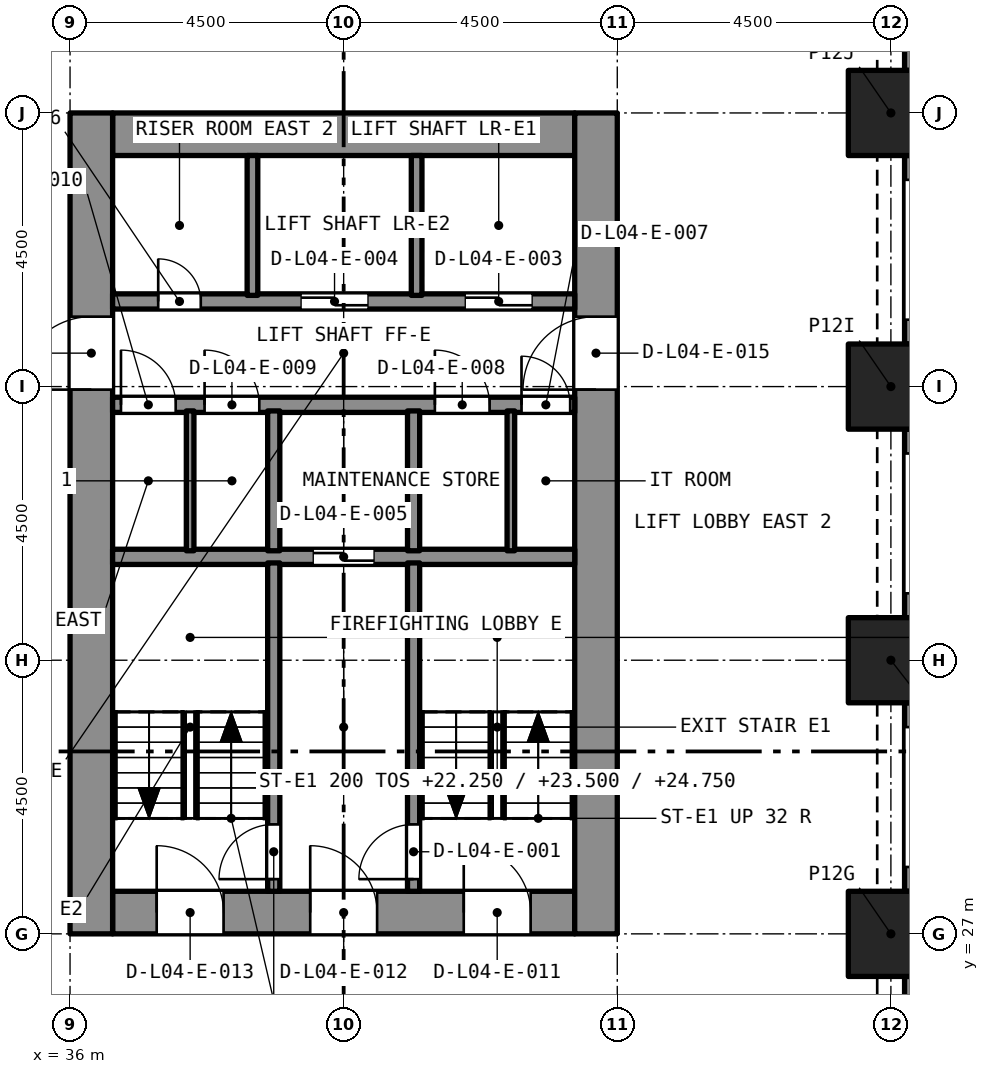
"""IFC4 building model, lengths in metres.
Left out: names, types, materials, properties, quantities, classifications, styles, units other than length and angle.
Written with IfcOpenShell. Run it as: python <this file> out.ifc"""

import sys

from ifc_helpers import new_model, si_unit, direction, frame, frame_2d, origin, origin_2d, place, context, subcontext, project, spatial, rectangle, extrude, element, fill, save


model = new_model("IFC4")
c1 = context("Model", 3, precision=1e-05, world=origin(), true_north=direction((0.0, 1.0)))
c2 = subcontext(c1, "Body", "Model", "MODEL_VIEW")
j1 = project(units=[si_unit("LENGTHUNIT", "METRE"), si_unit("PLANEANGLEUNIT", "RADIAN")], contexts=[c1])
p1 = place(None, origin())
s1 = spatial("IfcSite", under=j1, at=p1, CompositionType="ELEMENT")
p2 = place(p1, origin())
s2 = spatial("IfcBuilding", under=s1, at=p2, CompositionType="ELEMENT")
p3 = place(p2, frame((0.0, 0.0, 21.0)))
s3 = spatial("IfcBuildingStorey", under=s2, at=p3, CompositionType="ELEMENT", Elevation=21.0)
for number, where, z_axis, x_axis in (
    (1, (49.5, 27.0, 0.0), (0.0, 0.0, 1.0), (1.0, 0.0, 0.0)),
    (2, (49.5, 31.5, 0.0), (0.0, 0.0, 1.0), (1.0, 0.0, 0.0)),
    (3, (49.5, 36.0, 0.0), (0.0, 0.0, 1.0), (1.0, 0.0, 0.0)),
    (4, (49.5, 40.5, 0.0), (0.0, 0.0, 1.0), (1.0, 0.0, 0.0)),
):
    element("IfcColumn", number, at=place(p3, frame(where, z_axis=z_axis, x_axis=x_axis)), inside=s3, PredefinedType="COLUMN", context=c2, shape_type="SweptSolid", body=[
        extrude(rectangle(XDim=1.4, YDim=1.4, at=origin_2d()), origin(), (0.0, 0.0, 1.0), 5.0),
    ])
p4 = place(p3, frame((36.7, 27.35, 0.0), z_axis=(0.0, 0.0, 1.0), x_axis=(1.0, 0.0, 0.0)))
e5 = element("IfcWall", 5, at=p4, inside=s3, PredefinedType="SOLIDWALL", context=c2, shape_type="SweptSolid", body=[
    extrude(rectangle(XDim=7.6, YDim=0.7, at=frame_2d((3.8, 0.0))), origin(), (0.0, 0.0, 1.0), 5.0),
])
p5 = place(p4, frame((5.775, 0.0, 0.0)))
e6 = element("IfcOpeningElement", 6, at=p5, cuts=e5, PredefinedType="OPENING", context=c2, shape_type="SweptSolid", body=[
    extrude(rectangle(XDim=1.1, YDim=2.1, at=frame_2d((0.55, 1.05))), frame((0.0, 0.36, 0.0), z_axis=(0.0, -1.0, 0.0), x_axis=(1.0, 0.0, 0.0)), (0.0, 0.0, 1.0), 0.72),
])
p6 = place(p4, frame((3.25, 0.0, 0.0)))
e7 = element("IfcOpeningElement", 7, at=p6, cuts=e5, PredefinedType="OPENING", context=c2, shape_type="SweptSolid", body=[
    extrude(rectangle(XDim=1.1, YDim=2.1, at=frame_2d((0.55, 1.05))), frame((0.0, 0.36, 0.0), z_axis=(0.0, -1.0, 0.0), x_axis=(1.0, 0.0, 0.0)), (0.0, 0.0, 1.0), 0.72),
])
p7 = place(p4, frame((0.725, 0.0, 0.0)))
e8 = element("IfcOpeningElement", 8, at=p7, cuts=e5, PredefinedType="OPENING", context=c2, shape_type="SweptSolid", body=[
    extrude(rectangle(XDim=1.1, YDim=2.1, at=frame_2d((0.55, 1.05))), frame((0.0, 0.36, 0.0), z_axis=(0.0, -1.0, 0.0), x_axis=(1.0, 0.0, 0.0)), (0.0, 0.0, 1.0), 0.72),
])
p8 = place(p3, frame((36.7, 40.15, 0.0), z_axis=(0.0, 0.0, 1.0), x_axis=(1.0, 0.0, 0.0)))
e9 = element("IfcWall", 9, at=p8, inside=s3, PredefinedType="SOLIDWALL", context=c2, shape_type="SweptSolid", body=[
    extrude(rectangle(XDim=7.6, YDim=0.7, at=frame_2d((3.8, 0.0))), origin(), (0.0, 0.0, 1.0), 5.0),
])
p9 = place(p3, frame((36.35, 27.0, 0.0), z_axis=(0.0, 0.0, 1.0), x_axis=(0.0, 1.0, 0.0)))
e10 = element("IfcWall", 10, at=p9, inside=s3, PredefinedType="SOLIDWALL", context=c2, shape_type="SweptSolid", body=[
    extrude(rectangle(XDim=13.5, YDim=0.7, at=frame_2d((6.75, 0.0))), origin(), (0.0, 0.0, 1.0), 5.0),
])
p10 = place(p9, frame((8.95, 0.0, 0.0)))
e11 = element("IfcOpeningElement", 11, at=p10, cuts=e10, PredefinedType="OPENING", context=c2, shape_type="SweptSolid", body=[
    extrude(rectangle(XDim=1.2, YDim=2.1, at=frame_2d((0.6, 1.05))), frame((0.0, 0.36, 0.0), z_axis=(0.0, -1.0, 0.0), x_axis=(1.0, 0.0, 0.0)), (0.0, 0.0, 1.0), 0.72),
])
p11 = place(p3, frame((44.65, 27.0, 0.0), z_axis=(0.0, 0.0, 1.0), x_axis=(0.0, 1.0, 0.0)))
e12 = element("IfcWall", 12, at=p11, inside=s3, PredefinedType="SOLIDWALL", context=c2, shape_type="SweptSolid", body=[
    extrude(rectangle(XDim=13.5, YDim=0.7, at=frame_2d((6.75, 0.0))), origin(), (0.0, 0.0, 1.0), 5.0),
])
p12 = place(p11, frame((8.95, 0.0, 0.0)))
e13 = element("IfcOpeningElement", 13, at=p12, cuts=e12, PredefinedType="OPENING", context=c2, shape_type="SweptSolid", body=[
    extrude(rectangle(XDim=1.2, YDim=2.1, at=frame_2d((0.6, 1.05))), frame((0.0, 0.36, 0.0), z_axis=(0.0, -1.0, 0.0), x_axis=(1.0, 0.0, 0.0)), (0.0, 0.0, 1.0), 0.72),
])
p13 = place(p3, frame((49.875, 26.3, 0.0), z_axis=(0.0, 0.0, 1.0), x_axis=(0.0, -1.0, 0.0)))
e14 = element("IfcWall", 14, at=p13, inside=s3, PredefinedType="SOLIDWALL", context=c2, shape_type="SweptSolid", body=[
    extrude(rectangle(XDim=3.1, YDim=0.3, at=frame_2d((1.55, 0.0))), origin(), (0.0, 0.0, 1.0), 5.0),
])
p14 = place(p13, frame((0.4, 0.0, 0.45)))
e15 = element("IfcOpeningElement", 15, at=p14, cuts=e14, PredefinedType="OPENING", context=c2, shape_type="SweptSolid", body=[
    extrude(rectangle(XDim=2.3, YDim=3.3, at=frame_2d((1.15, 1.65))), frame((0.0, 0.16, 0.0), z_axis=(0.0, -1.0, 0.0), x_axis=(1.0, 0.0, 0.0)), (0.0, 0.0, 1.0), 0.32),
])
p15 = place(p3, frame((49.875, 30.8, 0.0), z_axis=(0.0, 0.0, 1.0), x_axis=(0.0, -1.0, 0.0)))
e16 = element("IfcWall", 16, at=p15, inside=s3, PredefinedType="SOLIDWALL", context=c2, shape_type="SweptSolid", body=[
    extrude(rectangle(XDim=3.1, YDim=0.3, at=frame_2d((1.55, 0.0))), origin(), (0.0, 0.0, 1.0), 5.0),
])
p16 = place(p15, frame((0.4, 0.0, 0.45)))
e17 = element("IfcOpeningElement", 17, at=p16, cuts=e16, PredefinedType="OPENING", context=c2, shape_type="SweptSolid", body=[
    extrude(rectangle(XDim=2.3, YDim=3.3, at=frame_2d((1.15, 1.65))), frame((0.0, 0.16, 0.0), z_axis=(0.0, -1.0, 0.0), x_axis=(1.0, 0.0, 0.0)), (0.0, 0.0, 1.0), 0.32),
])
p17 = place(p3, frame((49.875, 35.3, 0.0), z_axis=(0.0, 0.0, 1.0), x_axis=(0.0, -1.0, 0.0)))
e18 = element("IfcWall", 18, at=p17, inside=s3, PredefinedType="SOLIDWALL", context=c2, shape_type="SweptSolid", body=[
    extrude(rectangle(XDim=3.1, YDim=0.3, at=frame_2d((1.55, 0.0))), origin(), (0.0, 0.0, 1.0), 5.0),
])
p18 = place(p17, frame((0.4, 0.0, 0.45)))
e19 = element("IfcOpeningElement", 19, at=p18, cuts=e18, PredefinedType="OPENING", context=c2, shape_type="SweptSolid", body=[
    extrude(rectangle(XDim=2.3, YDim=3.3, at=frame_2d((1.15, 1.65))), frame((0.0, 0.16, 0.0), z_axis=(0.0, -1.0, 0.0), x_axis=(1.0, 0.0, 0.0)), (0.0, 0.0, 1.0), 0.32),
])
p19 = place(p3, frame((49.875, 39.8, 0.0), z_axis=(0.0, 0.0, 1.0), x_axis=(0.0, -1.0, 0.0)))
e20 = element("IfcWall", 20, at=p19, inside=s3, PredefinedType="SOLIDWALL", context=c2, shape_type="SweptSolid", body=[
    extrude(rectangle(XDim=3.1, YDim=0.3, at=frame_2d((1.55, 0.0))), origin(), (0.0, 0.0, 1.0), 5.0),
])
p20 = place(p19, frame((0.4, 0.0, 0.45)))
e21 = element("IfcOpeningElement", 21, at=p20, cuts=e20, PredefinedType="OPENING", context=c2, shape_type="SweptSolid", body=[
    extrude(rectangle(XDim=2.3, YDim=3.3, at=frame_2d((1.15, 1.65))), frame((0.0, 0.16, 0.0), z_axis=(0.0, -1.0, 0.0), x_axis=(1.0, 0.0, 0.0)), (0.0, 0.0, 1.0), 0.32),
])
p21 = place(p3, frame((49.875, 44.3, 0.0), z_axis=(0.0, 0.0, 1.0), x_axis=(0.0, -1.0, 0.0)))
e22 = element("IfcWall", 22, at=p21, inside=s3, PredefinedType="SOLIDWALL", context=c2, shape_type="SweptSolid", body=[
    extrude(rectangle(XDim=3.1, YDim=0.3, at=frame_2d((1.55, 0.0))), origin(), (0.0, 0.0, 1.0), 5.0),
])
p22 = place(p21, frame((0.4, 0.0, 0.45)))
e23 = element("IfcOpeningElement", 23, at=p22, cuts=e22, PredefinedType="OPENING", context=c2, shape_type="SweptSolid", body=[
    extrude(rectangle(XDim=2.3, YDim=3.3, at=frame_2d((1.15, 1.65))), frame((0.0, 0.16, 0.0), z_axis=(0.0, -1.0, 0.0), x_axis=(1.0, 0.0, 0.0)), (0.0, 0.0, 1.0), 0.32),
])
p23 = place(p3, frame((36.7, 33.2, 0.0), z_axis=(0.0, 0.0, 1.0), x_axis=(1.0, 0.0, 0.0)))
e24 = element("IfcWall", 24, at=p23, inside=s3, PredefinedType="SOLIDWALL", context=c2, shape_type="SweptSolid", body=[
    extrude(rectangle(XDim=7.6, YDim=0.25, at=frame_2d((3.8, 0.0))), origin(), (0.0, 0.0, 1.0), 4.65),
])
p24 = place(p23, frame((3.3, 0.0, 0.0)))
e25 = element("IfcOpeningElement", 25, at=p24, cuts=e24, PredefinedType="OPENING", context=c2, shape_type="SweptSolid", body=[
    extrude(rectangle(XDim=1.0, YDim=2.1, at=frame_2d((0.5, 1.05))), frame((0.0, 0.135, 0.0), z_axis=(0.0, -1.0, 0.0), x_axis=(1.0, 0.0, 0.0)), (0.0, 0.0, 1.0), 0.27),
])
p25 = place(p3, frame((36.7, 35.7, 0.0), z_axis=(0.0, 0.0, 1.0), x_axis=(1.0, 0.0, 0.0)))
e26 = element("IfcWall", 26, at=p25, inside=s3, PredefinedType="SOLIDWALL", context=c2, shape_type="SweptSolid", body=[
    extrude(rectangle(XDim=7.6, YDim=0.25, at=frame_2d((3.8, 0.0))), origin(), (0.0, 0.0, 1.0), 4.65),
])
p26 = place(p25, frame((6.725, 0.0, 0.0)))
e27 = element("IfcOpeningElement", 27, at=p26, cuts=e26, PredefinedType="OPENING", context=c2, shape_type="SweptSolid", body=[
    extrude(rectangle(XDim=0.8, YDim=2.1, at=frame_2d((0.4, 1.05))), frame((0.0, 0.135, 0.0), z_axis=(0.0, -1.0, 0.0), x_axis=(1.0, 0.0, 0.0)), (0.0, 0.0, 1.0), 0.27),
])
p27 = place(p25, frame((5.3, 0.0, 0.0)))
e28 = element("IfcOpeningElement", 28, at=p27, cuts=e26, PredefinedType="OPENING", context=c2, shape_type="SweptSolid", body=[
    extrude(rectangle(XDim=0.9, YDim=2.1, at=frame_2d((0.45, 1.05))), frame((0.0, 0.135, 0.0), z_axis=(0.0, -1.0, 0.0), x_axis=(1.0, 0.0, 0.0)), (0.0, 0.0, 1.0), 0.27),
])
p28 = place(p25, frame((1.512, 0.0, 0.0)))
e29 = element("IfcOpeningElement", 29, at=p28, cuts=e26, PredefinedType="OPENING", context=c2, shape_type="SweptSolid", body=[
    extrude(rectangle(XDim=0.9, YDim=2.1, at=frame_2d((0.45, 1.05))), frame((0.0, 0.135, 0.0), z_axis=(0.0, -1.0, 0.0), x_axis=(1.0, 0.0, 0.0)), (0.0, 0.0, 1.0), 0.27),
])
p29 = place(p25, frame((0.137, 0.0, 0.0)))
e30 = element("IfcOpeningElement", 30, at=p29, cuts=e26, PredefinedType="OPENING", context=c2, shape_type="SweptSolid", body=[
    extrude(rectangle(XDim=0.9, YDim=2.1, at=frame_2d((0.45, 1.05))), frame((0.0, 0.135, 0.0), z_axis=(0.0, -1.0, 0.0), x_axis=(1.0, 0.0, 0.0)), (0.0, 0.0, 1.0), 0.27),
])
p30 = place(p3, frame((36.7, 37.4, 0.0), z_axis=(0.0, 0.0, 1.0), x_axis=(1.0, 0.0, 0.0)))
e31 = element("IfcWall", 31, at=p30, inside=s3, PredefinedType="SOLIDWALL", context=c2, shape_type="SweptSolid", body=[
    extrude(rectangle(XDim=7.6, YDim=0.25, at=frame_2d((3.8, 0.0))), origin(), (0.0, 0.0, 1.0), 4.65),
])
p31 = place(p30, frame((5.8, 0.0, 0.0)))
e32 = element("IfcOpeningElement", 32, at=p31, cuts=e31, PredefinedType="OPENING", context=c2, shape_type="SweptSolid", body=[
    extrude(rectangle(XDim=1.1, YDim=2.4, at=frame_2d((0.55, 1.2))), frame((0.0, 0.135, 0.0), z_axis=(0.0, -1.0, 0.0), x_axis=(1.0, 0.0, 0.0)), (0.0, 0.0, 1.0), 0.27),
])
p32 = place(p30, frame((3.1, 0.0, 0.0)))
e33 = element("IfcOpeningElement", 33, at=p32, cuts=e31, PredefinedType="OPENING", context=c2, shape_type="SweptSolid", body=[
    extrude(rectangle(XDim=1.1, YDim=2.4, at=frame_2d((0.55, 1.2))), frame((0.0, 0.135, 0.0), z_axis=(0.0, -1.0, 0.0), x_axis=(1.0, 0.0, 0.0)), (0.0, 0.0, 1.0), 0.27),
])
p33 = place(p30, frame((0.75, 0.0, 0.0)))
e34 = element("IfcOpeningElement", 34, at=p33, cuts=e31, PredefinedType="OPENING", context=c2, shape_type="SweptSolid", body=[
    extrude(rectangle(XDim=0.7, YDim=2.1, at=frame_2d((0.35, 1.05))), frame((0.0, 0.135, 0.0), z_axis=(0.0, -1.0, 0.0), x_axis=(1.0, 0.0, 0.0)), (0.0, 0.0, 1.0), 0.27),
])
p34 = place(p3, frame((41.65, 27.7, 0.0), z_axis=(0.0, 0.0, 1.0), x_axis=(0.0, 1.0, 0.0)))
e35 = element("IfcWall", 35, at=p34, inside=s3, PredefinedType="SOLIDWALL", context=c2, shape_type="SweptSolid", body=[
    extrude(rectangle(XDim=5.4, YDim=0.2, at=frame_2d((2.7, 0.0))), origin(), (0.0, 0.0, 1.0), 4.65),
])
p35 = place(p34, frame((0.2, 0.0, 0.0)))
e36 = element("IfcOpeningElement", 36, at=p35, cuts=e35, PredefinedType="OPENING", context=c2, shape_type="SweptSolid", body=[
    extrude(rectangle(XDim=0.9, YDim=2.1, at=frame_2d((0.45, 1.05))), frame((0.0, 0.11, 0.0), z_axis=(0.0, -1.0, 0.0), x_axis=(1.0, 0.0, 0.0)), (0.0, 0.0, 1.0), 0.22),
])
p36 = place(p3, frame((39.35, 27.7, 0.0), z_axis=(0.0, 0.0, 1.0), x_axis=(0.0, 1.0, 0.0)))
e37 = element("IfcWall", 37, at=p36, inside=s3, PredefinedType="SOLIDWALL", context=c2, shape_type="SweptSolid", body=[
    extrude(rectangle(XDim=5.4, YDim=0.2, at=frame_2d((2.7, 0.0))), origin(), (0.0, 0.0, 1.0), 4.65),
])
p37 = place(p36, frame((0.2, 0.0, 0.0)))
e38 = element("IfcOpeningElement", 38, at=p37, cuts=e37, PredefinedType="OPENING", context=c2, shape_type="SweptSolid", body=[
    extrude(rectangle(XDim=0.9, YDim=2.1, at=frame_2d((0.45, 1.05))), frame((0.0, 0.11, 0.0), z_axis=(0.0, -1.0, 0.0), x_axis=(1.0, 0.0, 0.0)), (0.0, 0.0, 1.0), 0.22),
])
for number, where, z_axis, x_axis in (
    (39, (41.65, 33.3, 0.0), (0.0, 0.0, 1.0), (0.0, 1.0, 0.0)),
    (40, (39.35, 33.3, 0.0), (0.0, 0.0, 1.0), (0.0, 1.0, 0.0)),
):
    element("IfcWall", number, at=place(p3, frame(where, z_axis=z_axis, x_axis=x_axis)), inside=s3, PredefinedType="SOLIDWALL", context=c2, shape_type="SweptSolid", body=[
        extrude(rectangle(XDim=2.3, YDim=0.2, at=frame_2d((1.15, 0.0))), origin(), (0.0, 0.0, 1.0), 4.65),
    ])
for number, where, z_axis, x_axis in (
    (41, (41.7, 37.5, 0.0), (0.0, 0.0, 1.0), (0.0, 1.0, 0.0)),
    (42, (39.0, 37.5, 0.0), (0.0, 0.0, 1.0), (0.0, 1.0, 0.0)),
):
    element("IfcWall", number, at=place(p3, frame(where, z_axis=z_axis, x_axis=x_axis)), inside=s3, PredefinedType="SOLIDWALL", context=c2, shape_type="SweptSolid", body=[
        extrude(rectangle(XDim=2.3, YDim=0.175, at=frame_2d((1.15, 0.0))), origin(), (0.0, 0.0, 1.0), 4.65),
    ])
for number, where, z_axis, x_axis in (
    (43, (43.25, 33.3, 0.0), (0.0, 0.0, 1.0), (0.0, 1.0, 0.0)),
    (44, (37.975, 33.3, 0.0), (0.0, 0.0, 1.0), (0.0, 1.0, 0.0)),
):
    element("IfcWall", number, at=place(p3, frame(where, z_axis=z_axis, x_axis=x_axis)), inside=s3, PredefinedType="PARTITIONING", context=c2, shape_type="SweptSolid", body=[
        extrude(rectangle(XDim=2.3, YDim=0.125, at=frame_2d((1.15, 0.0))), origin(), (0.0, 0.0, 1.0), 4.65),
    ])
p38 = place(p35, origin())
e45 = element("IfcDoor", 45, at=p38, inside=s3, OperationType="SINGLE_SWING_LEFT", PredefinedType="DOOR", context=c2, shape_type="SweptSolid", body=[
    extrude(rectangle(XDim=0.9, YDim=2.1, at=frame_2d((0.45, 1.05))), frame((0.0, 0.025, 0.0), z_axis=(0.0, -1.0, 0.0), x_axis=(1.0, 0.0, 0.0)), (0.0, 0.0, 1.0), 0.05),
])
fill(e36, e45)
p39 = place(p37, origin())
e46 = element("IfcDoor", 46, at=p39, inside=s3, OperationType="SINGLE_SWING_LEFT", PredefinedType="DOOR", context=c2, shape_type="SweptSolid", body=[
    extrude(rectangle(XDim=0.9, YDim=2.1, at=frame_2d((0.45, 1.05))), frame((0.0, 0.025, 0.0), z_axis=(0.0, -1.0, 0.0), x_axis=(1.0, 0.0, 0.0)), (0.0, 0.0, 1.0), 0.05),
])
fill(e38, e46)
p40 = place(p31, origin())
e47 = element("IfcDoor", 47, at=p40, inside=s3, OperationType="SLIDING_TO_LEFT", PredefinedType="DOOR", context=c2, shape_type="SweptSolid", body=[
    extrude(rectangle(XDim=1.1, YDim=2.4, at=frame_2d((0.55, 1.2))), frame((0.0, 0.025, 0.0), z_axis=(0.0, -1.0, 0.0), x_axis=(1.0, 0.0, 0.0)), (0.0, 0.0, 1.0), 0.05),
])
fill(e32, e47)
p41 = place(p32, origin())
e48 = element("IfcDoor", 48, at=p41, inside=s3, OperationType="SLIDING_TO_LEFT", PredefinedType="DOOR", context=c2, shape_type="SweptSolid", body=[
    extrude(rectangle(XDim=1.1, YDim=2.4, at=frame_2d((0.55, 1.2))), frame((0.0, 0.025, 0.0), z_axis=(0.0, -1.0, 0.0), x_axis=(1.0, 0.0, 0.0)), (0.0, 0.0, 1.0), 0.05),
])
fill(e33, e48)
p42 = place(p24, origin())
e49 = element("IfcDoor", 49, at=p42, inside=s3, OperationType="SLIDING_TO_LEFT", PredefinedType="DOOR", context=c2, shape_type="SweptSolid", body=[
    extrude(rectangle(XDim=1.0, YDim=2.1, at=frame_2d((0.5, 1.05))), frame((0.0, 0.025, 0.0), z_axis=(0.0, -1.0, 0.0), x_axis=(1.0, 0.0, 0.0)), (0.0, 0.0, 1.0), 0.05),
])
fill(e25, e49)
p43 = place(p33, origin())
e50 = element("IfcDoor", 50, at=p43, inside=s3, OperationType="SINGLE_SWING_LEFT", PredefinedType="DOOR", context=c2, shape_type="SweptSolid", body=[
    extrude(rectangle(XDim=0.7, YDim=2.1, at=frame_2d((0.35, 1.05))), frame((0.0, 0.025, 0.0), z_axis=(0.0, -1.0, 0.0), x_axis=(1.0, 0.0, 0.0)), (0.0, 0.0, 1.0), 0.05),
])
fill(e34, e50)
p44 = place(p26, origin())
e51 = element("IfcDoor", 51, at=p44, inside=s3, OperationType="SINGLE_SWING_LEFT", PredefinedType="DOOR", context=c2, shape_type="SweptSolid", body=[
    extrude(rectangle(XDim=0.8, YDim=2.1, at=frame_2d((0.4, 1.05))), frame((0.0, 0.025, 0.0), z_axis=(0.0, -1.0, 0.0), x_axis=(1.0, 0.0, 0.0)), (0.0, 0.0, 1.0), 0.05),
])
fill(e27, e51)
p45 = place(p27, origin())
e52 = element("IfcDoor", 52, at=p45, inside=s3, OperationType="SINGLE_SWING_LEFT", PredefinedType="DOOR", context=c2, shape_type="SweptSolid", body=[
    extrude(rectangle(XDim=0.9, YDim=2.1, at=frame_2d((0.45, 1.05))), frame((0.0, 0.025, 0.0), z_axis=(0.0, -1.0, 0.0), x_axis=(1.0, 0.0, 0.0)), (0.0, 0.0, 1.0), 0.05),
])
fill(e28, e52)
p46 = place(p28, origin())
e53 = element("IfcDoor", 53, at=p46, inside=s3, OperationType="SINGLE_SWING_LEFT", PredefinedType="DOOR", context=c2, shape_type="SweptSolid", body=[
    extrude(rectangle(XDim=0.9, YDim=2.1, at=frame_2d((0.45, 1.05))), frame((0.0, 0.025, 0.0), z_axis=(0.0, -1.0, 0.0), x_axis=(1.0, 0.0, 0.0)), (0.0, 0.0, 1.0), 0.05),
])
fill(e29, e53)
p47 = place(p29, origin())
e54 = element("IfcDoor", 54, at=p47, inside=s3, OperationType="SINGLE_SWING_LEFT", PredefinedType="DOOR", context=c2, shape_type="SweptSolid", body=[
    extrude(rectangle(XDim=0.9, YDim=2.1, at=frame_2d((0.45, 1.05))), frame((0.0, 0.025, 0.0), z_axis=(0.0, -1.0, 0.0), x_axis=(1.0, 0.0, 0.0)), (0.0, 0.0, 1.0), 0.05),
])
fill(e30, e54)
p48 = place(p5, origin())
e55 = element("IfcDoor", 55, at=p48, inside=s3, OperationType="SINGLE_SWING_LEFT", PredefinedType="DOOR", context=c2, shape_type="SweptSolid", body=[
    extrude(rectangle(XDim=1.1, YDim=2.1, at=frame_2d((0.55, 1.05))), frame((0.0, 0.025, 0.0), z_axis=(0.0, -1.0, 0.0), x_axis=(1.0, 0.0, 0.0)), (0.0, 0.0, 1.0), 0.05),
])
fill(e6, e55)
p49 = place(p6, origin())
e56 = element("IfcDoor", 56, at=p49, inside=s3, OperationType="SINGLE_SWING_LEFT", PredefinedType="DOOR", context=c2, shape_type="SweptSolid", body=[
    extrude(rectangle(XDim=1.1, YDim=2.1, at=frame_2d((0.55, 1.05))), frame((0.0, 0.025, 0.0), z_axis=(0.0, -1.0, 0.0), x_axis=(1.0, 0.0, 0.0)), (0.0, 0.0, 1.0), 0.05),
])
fill(e7, e56)
p50 = place(p7, origin())
e57 = element("IfcDoor", 57, at=p50, inside=s3, OperationType="SINGLE_SWING_LEFT", PredefinedType="DOOR", context=c2, shape_type="SweptSolid", body=[
    extrude(rectangle(XDim=1.1, YDim=2.1, at=frame_2d((0.55, 1.05))), frame((0.0, 0.025, 0.0), z_axis=(0.0, -1.0, 0.0), x_axis=(1.0, 0.0, 0.0)), (0.0, 0.0, 1.0), 0.05),
])
fill(e8, e57)
p51 = place(p10, origin())
e58 = element("IfcDoor", 58, at=p51, inside=s3, OperationType="SINGLE_SWING_LEFT", PredefinedType="DOOR", context=c2, shape_type="SweptSolid", body=[
    extrude(rectangle(XDim=1.2, YDim=2.1, at=frame_2d((0.6, 1.05))), frame((0.0, 0.025, 0.0), z_axis=(0.0, -1.0, 0.0), x_axis=(1.0, 0.0, 0.0)), (0.0, 0.0, 1.0), 0.05),
])
fill(e11, e58)
p52 = place(p12, origin())
e59 = element("IfcDoor", 59, at=p52, inside=s3, OperationType="SINGLE_SWING_LEFT", PredefinedType="DOOR", context=c2, shape_type="SweptSolid", body=[
    extrude(rectangle(XDim=1.2, YDim=2.1, at=frame_2d((0.6, 1.05))), frame((0.0, 0.025, 0.0), z_axis=(0.0, -1.0, 0.0), x_axis=(1.0, 0.0, 0.0)), (0.0, 0.0, 1.0), 0.05),
])
fill(e13, e59)
save(model, sys.argv[1])
